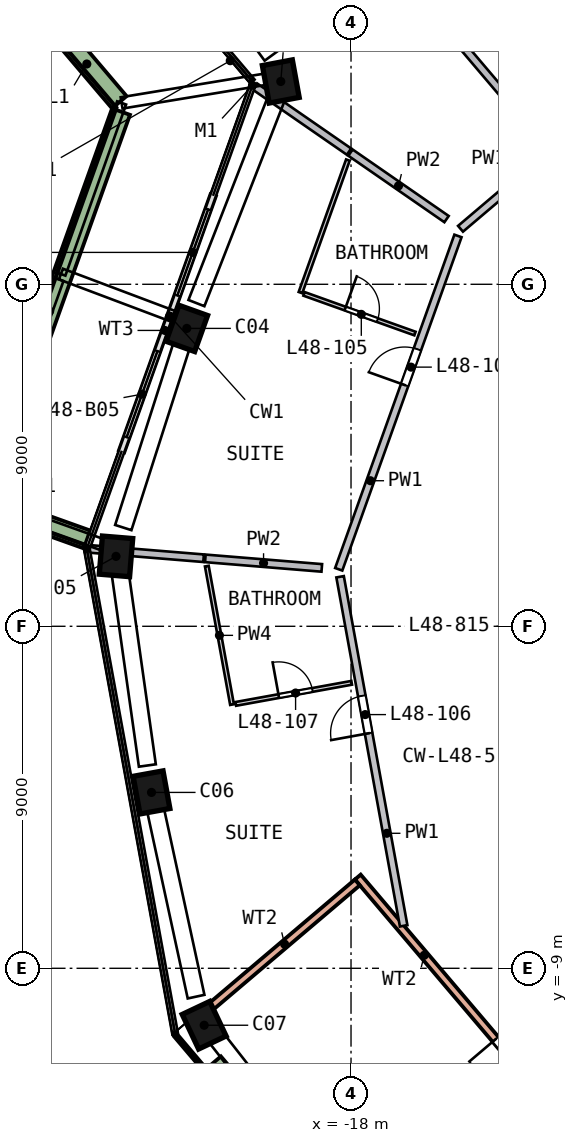
"""IFC4 building model, lengths in metres.
Left out: names, types, materials, properties, quantities, classifications, styles, units other than length and angle.
Written with IfcOpenShell. Run it as: python <this file> out.ifc"""

import sys

from ifc_helpers import new_model, si_unit, direction, frame, frame_2d, origin, origin_2d, place, context, subcontext, project, spatial, rectangle, extrude, element, fill, save


model = new_model("IFC4")
c1 = context("Model", 3, precision=1e-05, world=origin(), true_north=direction((0.0, 1.0)))
c2 = subcontext(c1, "Body", "Model", "MODEL_VIEW")
j1 = project(units=[si_unit("LENGTHUNIT", "METRE"), si_unit("PLANEANGLEUNIT", "RADIAN")], contexts=[c1])
p1 = place(None, origin())
s1 = spatial("IfcSite", under=j1, at=p1, CompositionType="ELEMENT")
p2 = place(p1, origin())
s2 = spatial("IfcBuilding", under=s1, at=p2, CompositionType="ELEMENT")
p3 = place(p2, frame((0.0, 0.0, 197.5)))
s3 = spatial("IfcBuildingStorey", under=s2, at=p3, CompositionType="ELEMENT", Elevation=197.5)
p4 = place(p3, frame((-19.766, 14.451, 0.0), z_axis=(-0.067880715, -0.094561713, 0.993202039), x_axis=(-0.18554858, 0.979327278, 0.080559334)))
e1 = element("IfcColumn", 1, at=p4, inside=s3, PredefinedType="COLUMN", context=c2, shape_type="SweptSolid", body=[
    extrude(rectangle(XDim=1.0, YDim=0.8, at=origin_2d()), origin(), (0.0, 0.0, 1.0), 3.212),
])
p5 = place(p3, frame((-22.276, 7.967, 0.0), z_axis=(-0.037035652, -0.106239847, 0.99365057), x_axis=(-0.33503593, -0.935464206, -0.112506199)))
e2 = element("IfcColumn", 2, at=p5, inside=s3, PredefinedType="COLUMN", context=c2, shape_type="SweptSolid", body=[
    extrude(rectangle(XDim=1.0, YDim=0.8, at=origin_2d()), origin(), (0.0, 0.0, 1.0), 3.21),
])
p6 = place(p3, frame((-24.174, 1.979, 0.0), z_axis=(-0.008514659, -0.115023924, 0.993326229), x_axis=(0.08173816, 0.989957987, 0.115334541)))
e3 = element("IfcColumn", 3, at=p6, inside=s3, PredefinedType="COLUMN", context=c2, shape_type="SweptSolid", body=[
    extrude(rectangle(XDim=1.0, YDim=0.8, at=origin_2d()), origin(), (0.0, 0.0, 1.0), 3.211),
])
p7 = place(p3, frame((-23.276, -4.238, 0.0), z_axis=(0.021065327, -0.110573955, 0.993644631), x_axis=(0.177664557, -0.977632783, -0.112558637)))
e4 = element("IfcColumn", 4, at=p7, inside=s3, PredefinedType="COLUMN", context=c2, shape_type="SweptSolid", body=[
    extrude(rectangle(XDim=1.0, YDim=0.8, at=origin_2d()), origin(), (0.0, 0.0, 1.0), 3.21),
])
p8 = place(p3, frame((-21.925, -10.373, 0.0), z_axis=(0.050251525, -0.103848084, 0.993322888), x_axis=(-0.425063091, 0.897782086, 0.115363312)))
e5 = element("IfcColumn", 5, at=p8, inside=s3, PredefinedType="COLUMN", context=c2, shape_type="SweptSolid", body=[
    extrude(rectangle(XDim=1.0, YDim=0.8, at=origin_2d()), origin(), (0.0, 0.0, 1.0), 3.211),
])
p9 = place(p3, frame((-21.626, 11.345, 0.0), z_axis=(0.0, 0.0, 1.0), x_axis=(-0.336768495, -0.941587479, 0.0)))
e6 = element("IfcWall", 6, at=p9, inside=s3, PredefinedType="SOLIDWALL", context=c2, shape_type="SweptSolid", body=[
    extrude(rectangle(XDim=3.4, YDim=0.15, at=frame_2d((1.7, 0.0))), origin(), (0.0, 0.0, 1.0), 2.475),
])
p10 = place(p9, frame((0.4, 0.0, 0.0)))
e7 = element("IfcOpeningElement", 7, at=p10, cuts=e6, PredefinedType="OPENING", context=c2, shape_type="SweptSolid", body=[
    extrude(rectangle(XDim=2.4, YDim=2.4, at=frame_2d((1.2, 1.2))), frame((0.0, 0.085, 0.0), z_axis=(0.0, -1.0, 0.0), x_axis=(1.0, 0.0, 0.0)), (0.0, 0.0, 1.0), 0.17),
])
p11 = place(p3, frame((-22.771, 8.144, 0.0), z_axis=(0.0, 0.0, 1.0), x_axis=(-0.336755785, -0.941592025, 0.0)))
e8 = element("IfcWall", 8, at=p11, inside=s3, PredefinedType="SOLIDWALL", context=c2, shape_type="SweptSolid", body=[
    extrude(rectangle(XDim=3.761, YDim=0.15, at=frame_2d((1.881, 0.0))), origin(), (0.0, 0.0, 1.0), 2.475),
])
p12 = place(p11, frame((0.961, 0.0, 0.0)))
e9 = element("IfcOpeningElement", 9, at=p12, cuts=e8, PredefinedType="OPENING", context=c2, shape_type="SweptSolid", body=[
    extrude(rectangle(XDim=2.4, YDim=2.4, at=frame_2d((1.2, 1.2))), frame((0.0, 0.085, 0.0), z_axis=(0.0, -1.0, 0.0), x_axis=(1.0, 0.0, 0.0)), (0.0, 0.0, 1.0), 0.17),
])
p13 = place(p3, frame((-25.807, 15.805, 0.0), z_axis=(0.0, 0.0, 1.0), x_axis=(0.647071825, -0.762429048, 0.0)))
e10 = element("IfcWall", 10, at=p13, inside=s3, PredefinedType="SOLIDWALL", context=c2, shape_type="SweptSolid", body=[
    extrude(rectangle(XDim=2.643, YDim=0.5, at=frame_2d((1.322, 0.0))), origin(), (0.0, 0.0, 1.0), 0.7),
])
p14 = place(p3, frame((-24.052, 13.543, 0.0), z_axis=(0.0, 0.0, 1.0), x_axis=(-0.336774581, -0.941585302, 0.0)))
e11 = element("IfcWall", 11, at=p14, inside=s3, PredefinedType="SOLIDWALL", context=c2, shape_type="SweptSolid", body=[
    extrude(rectangle(XDim=11.152, YDim=0.5, at=frame_2d((5.576, 0.0))), origin(), (0.0, 0.0, 1.0), 0.7),
])
p15 = place(p3, frame((-27.489, 3.194, 0.0), z_axis=(0.0, 0.0, 1.0), x_axis=(0.94159448, -0.336748919, 0.0)))
e12 = element("IfcWall", 12, at=p15, inside=s3, PredefinedType="SOLIDWALL", context=c2, shape_type="SweptSolid", body=[
    extrude(rectangle(XDim=2.699, YDim=0.5, at=frame_2d((1.35, 0.0))), origin(), (0.0, 0.0, 1.0), 0.7),
])
p16 = place(p3, frame((-9.41, -16.511, 0.0), z_axis=(0.0, 0.0, 1.0), x_axis=(-0.647046931, 0.762450175, 0.0)))
e13 = element("IfcWall", 13, at=p16, inside=s3, PredefinedType="SOLIDWALL", context=c2, shape_type="SweptSolid", body=[
    extrude(rectangle(XDim=13.0, YDim=0.2, at=frame_2d((6.5, 0.0))), origin(), (0.0, 0.0, 1.0), 3.19),
])
p17 = place(p16, frame((5.6, 0.0, 0.0)))
e14 = element("IfcOpeningElement", 14, at=p17, cuts=e13, PredefinedType="OPENING", context=c2, shape_type="SweptSolid", body=[
    extrude(rectangle(XDim=1.8, YDim=2.4, at=frame_2d((0.9, 1.2))), frame((0.0, 0.11, 0.0), z_axis=(0.0, -1.0, 0.0), x_axis=(1.0, 0.0, 0.0)), (0.0, 0.0, 1.0), 0.22),
])
p18 = place(p3, frame((-21.661, -9.989, 0.0), z_axis=(0.0, 0.0, 1.0), x_axis=(0.762442982, 0.647055406, 0.0)))
e15 = element("IfcWall", 15, at=p18, inside=s3, PredefinedType="SOLIDWALL", context=c2, shape_type="SweptSolid", body=[
    extrude(rectangle(XDim=5.021, YDim=0.2, at=frame_2d((2.51, 0.0))), origin(), (0.0, 0.0, 1.0), 3.19),
])
p19 = place(p3, frame((-22.612, -10.769, 0.0), z_axis=(0.0, 0.0, 1.0), x_axis=(0.647050477, -0.762447166, 0.0)))
e16 = element("IfcWall", 16, at=p19, inside=s3, PredefinedType="SOLIDWALL", context=c2, shape_type="SweptSolid", body=[
    extrude(rectangle(XDim=12.84, YDim=0.1, at=frame_2d((6.42, 0.0))), origin(), (0.0, 0.0, 1.0), 0.7),
])
p20 = place(p3, frame((-21.615, -11.48, 0.0), z_axis=(0.0, 0.0, 1.0), x_axis=(0.64706844, -0.762431921, 0.0)))
e17 = element("IfcWall", 17, at=p20, inside=s3, PredefinedType="SOLIDWALL", context=c2, shape_type="SweptSolid", body=[
    extrude(rectangle(XDim=4.633, YDim=0.5, at=frame_2d((2.316, 0.0))), origin(), (0.0, 0.0, 1.0), 0.7),
])
p21 = place(p3, frame((-16.615, -7.882, 0.0), z_axis=(0.0, 0.0, 1.0), x_axis=(-0.179145456, 0.983822599, 0.0)))
e18 = element("IfcWall", 18, at=p21, inside=s3, PredefinedType="SOLIDWALL", context=c2, shape_type="SweptSolid", body=[
    extrude(rectangle(XDim=9.337, YDim=0.2, at=frame_2d((4.668, 0.0))), origin(), (0.0, 0.0, 1.0), 3.19),
])
p22 = place(p21, frame((5.15, 0.0, 0.0)))
e19 = element("IfcOpeningElement", 19, at=p22, cuts=e18, PredefinedType="OPENING", context=c2, shape_type="SweptSolid", body=[
    extrude(rectangle(XDim=1.0, YDim=2.1, at=frame_2d((0.5, 1.05))), frame((0.0, 0.11, 0.0), z_axis=(0.0, -1.0, 0.0), x_axis=(1.0, 0.0, 0.0)), (0.0, 0.0, 1.0), 0.22),
])
p23 = place(p3, frame((-18.323, 1.5, 0.0), z_axis=(0.0, 0.0, 1.0), x_axis=(0.336758012, 0.941591228, 0.0)))
e20 = element("IfcWall", 20, at=p23, inside=s3, PredefinedType="SOLIDWALL", context=c2, shape_type="SweptSolid", body=[
    extrude(rectangle(XDim=9.317, YDim=0.2, at=frame_2d((4.658, 0.0))), origin(), (0.0, 0.0, 1.0), 3.19),
])
p24 = place(p23, frame((5.15, 0.0, 0.0)))
e21 = element("IfcOpeningElement", 21, at=p24, cuts=e20, PredefinedType="OPENING", context=c2, shape_type="SweptSolid", body=[
    extrude(rectangle(XDim=1.0, YDim=2.1, at=frame_2d((0.5, 1.05))), frame((0.0, 0.11, 0.0), z_axis=(0.0, -1.0, 0.0), x_axis=(1.0, 0.0, 0.0)), (0.0, 0.0, 1.0), 0.22),
])
p25 = place(p3, frame((-15.119, 10.461, 0.0), z_axis=(0.0, 0.0, 1.0), x_axis=(0.762438227, 0.64706101, 0.0)))
e22 = element("IfcWall", 22, at=p25, inside=s3, PredefinedType="SOLIDWALL", context=c2, shape_type="SweptSolid", body=[
    extrude(rectangle(XDim=9.317, YDim=0.2, at=frame_2d((4.658, 0.0))), origin(), (0.0, 0.0, 1.0), 3.19),
])
p26 = place(p25, frame((3.853, 0.0, 0.0)))
e23 = element("IfcOpeningElement", 23, at=p26, cuts=e22, PredefinedType="OPENING", context=c2, shape_type="SweptSolid", body=[
    extrude(rectangle(XDim=1.8, YDim=2.1, at=frame_2d((0.9, 1.05))), frame((0.0, 0.11, 0.0), z_axis=(0.0, -1.0, 0.0), x_axis=(1.0, 0.0, 0.0)), (0.0, 0.0, 1.0), 0.22),
])
p27 = place(p3, frame((-21.879, 1.791, 0.0), z_axis=(0.0, 0.0, 1.0), x_axis=(-0.996662173, 0.081636474, 0.0)))
e24 = element("IfcWall", 24, at=p27, inside=s3, PredefinedType="SOLIDWALL", context=c2, shape_type="SweptSolid", body=[
    extrude(rectangle(XDim=3.011, YDim=0.2, at=frame_2d((1.506, 0.0))), origin(), (0.0, 0.0, 1.0), 3.19),
])
p28 = place(p3, frame((-18.769, 1.537, 0.0), z_axis=(0.0, 0.0, 1.0), x_axis=(-0.996669487, 0.081547129, 0.0)))
e25 = element("IfcWall", 25, at=p28, inside=s3, PredefinedType="SOLIDWALL", context=c2, shape_type="SweptSolid", body=[
    extrude(rectangle(XDim=3.075, YDim=0.2, at=frame_2d((1.537, 0.0))), origin(), (0.0, 0.0, 1.0), 3.19),
])
p29 = place(p3, frame((-18.052, 12.491, 0.0), z_axis=(0.0, 0.0, 1.0), x_axis=(-0.822373098, 0.568948581, 0.0)))
e26 = element("IfcWall", 26, at=p29, inside=s3, PredefinedType="SOLIDWALL", context=c2, shape_type="SweptSolid", body=[
    extrude(rectangle(XDim=3.011, YDim=0.2, at=frame_2d((1.506, 0.0))), origin(), (0.0, 0.0, 1.0), 3.19),
])
p30 = place(p3, frame((-12.844, 12.654, 0.0), z_axis=(0.0, 0.0, 1.0), x_axis=(-0.647054482, 0.762443767, 0.0)))
e27 = element("IfcWall", 27, at=p30, inside=s3, PredefinedType="SOLIDWALL", context=c2, shape_type="SweptSolid", body=[
    extrude(rectangle(XDim=14.741, YDim=0.2, at=frame_2d((7.37, 0.0))), origin(), (0.0, 0.0, 1.0), 3.19),
])
p31 = place(p30, frame((4.6, 0.0, 0.0)))
e28 = element("IfcOpeningElement", 28, at=p31, cuts=e27, PredefinedType="OPENING", context=c2, shape_type="SweptSolid", body=[
    extrude(rectangle(XDim=1.0, YDim=2.1, at=frame_2d((0.5, 1.05))), frame((0.0, 0.11, 0.0), z_axis=(0.0, -1.0, 0.0), x_axis=(1.0, 0.0, 0.0)), (0.0, 0.0, 1.0), 0.22),
])
p32 = place(p3, frame((-15.486, 10.715, 0.0), z_axis=(0.0, 0.0, 1.0), x_axis=(-0.822349373, 0.568982872, 0.0)))
e29 = element("IfcWall", 29, at=p32, inside=s3, PredefinedType="SOLIDWALL", context=c2, shape_type="SweptSolid", body=[
    extrude(rectangle(XDim=3.075, YDim=0.2, at=frame_2d((1.537, 0.0))), origin(), (0.0, 0.0, 1.0), 3.19),
])
p33 = place(p3, frame((-19.856, 26.037, 0.0), z_axis=(0.0, 0.0, 1.0), x_axis=(0.64706411, -0.762435596, 0.0)))
e30 = element("IfcWall", 30, at=p33, inside=s3, PredefinedType="SOLIDWALL", context=c2, shape_type="SweptSolid", body=[
    extrude(rectangle(XDim=14.741, YDim=0.2, at=frame_2d((7.371, 0.0))), origin(), (0.0, 0.0, 1.0), 3.19),
])
p34 = place(p33, frame((4.65, 0.0, 0.0)))
e31 = element("IfcOpeningElement", 31, at=p34, cuts=e30, PredefinedType="OPENING", context=c2, shape_type="SweptSolid", body=[
    extrude(rectangle(XDim=1.0, YDim=2.1, at=frame_2d((0.5, 1.05))), frame((0.0, 0.11, 0.0), z_axis=(0.0, -1.0, 0.0), x_axis=(1.0, 0.0, 0.0)), (0.0, 0.0, 1.0), 0.22),
])
p35 = place(p3, frame((-21.131, -2.061, 0.0), z_axis=(0.0, 0.0, 1.0), x_axis=(-0.179152249, 0.983821362, 0.0)))
e32 = element("IfcWall", 32, at=p35, inside=s3, PredefinedType="PARTITIONING", context=c2, shape_type="SweptSolid", body=[
    extrude(rectangle(XDim=3.704, YDim=0.1, at=frame_2d((1.852, 0.0))), origin(), (0.0, 0.0, 1.0), 3.19),
])
p36 = place(p3, frame((-21.033, -2.042, 0.0), z_axis=(0.0, 0.0, 1.0), x_axis=(0.983832085, 0.179093353, 0.0)))
e33 = element("IfcWall", 33, at=p36, inside=s3, PredefinedType="PARTITIONING", context=c2, shape_type="SweptSolid", body=[
    extrude(rectangle(XDim=3.1, YDim=0.1, at=frame_2d((1.55, 0.0))), origin(), (0.0, 0.0, 1.0), 3.19),
])
p37 = place(p36, frame((1.15, 0.0, 0.0)))
e34 = element("IfcOpeningElement", 34, at=p37, cuts=e33, PredefinedType="OPENING", context=c2, shape_type="SweptSolid", body=[
    extrude(rectangle(XDim=0.9, YDim=2.1, at=frame_2d((0.45, 1.05))), frame((0.0, 0.06, 0.0), z_axis=(0.0, -1.0, 0.0), x_axis=(1.0, 0.0, 0.0)), (0.0, 0.0, 1.0), 0.12),
])
p38 = place(p3, frame((-19.33, 8.781, 0.0), z_axis=(0.0, 0.0, 1.0), x_axis=(0.336737198, 0.941598672, 0.0)))
e35 = element("IfcWall", 35, at=p38, inside=s3, PredefinedType="PARTITIONING", context=c2, shape_type="SweptSolid", body=[
    extrude(rectangle(XDim=3.704, YDim=0.1, at=frame_2d((1.852, 0.0))), origin(), (0.0, 0.0, 1.0), 3.19),
])
p39 = place(p3, frame((-19.236, 8.747, 0.0), z_axis=(0.0, 0.0, 1.0), x_axis=(0.941592149, -0.336755439, 0.0)))
e36 = element("IfcWall", 36, at=p39, inside=s3, PredefinedType="PARTITIONING", context=c2, shape_type="SweptSolid", body=[
    extrude(rectangle(XDim=3.1, YDim=0.1, at=frame_2d((1.55, 0.0))), origin(), (0.0, 0.0, 1.0), 3.19),
])
p40 = place(p39, frame((1.15, 0.0, 0.0)))
e37 = element("IfcOpeningElement", 37, at=p40, cuts=e36, PredefinedType="OPENING", context=c2, shape_type="SweptSolid", body=[
    extrude(rectangle(XDim=0.9, YDim=2.1, at=frame_2d((0.45, 1.05))), frame((0.0, 0.06, 0.0), z_axis=(0.0, -1.0, 0.0), x_axis=(1.0, 0.0, 0.0)), (0.0, 0.0, 1.0), 0.12),
])
p41 = place(p10, origin())
e38 = element("IfcDoor", 38, at=p41, inside=s3, OperationType="SLIDING_TO_RIGHT", PredefinedType="DOOR", context=c2, shape_type="SweptSolid", body=[
    extrude(rectangle(XDim=2.4, YDim=2.4, at=frame_2d((1.2, 1.2))), frame((0.0, 0.025, 0.0), z_axis=(0.0, -1.0, 0.0), x_axis=(1.0, 0.0, 0.0)), (0.0, 0.0, 1.0), 0.05),
])
fill(e7, e38)
p42 = place(p12, origin())
e39 = element("IfcDoor", 39, at=p42, inside=s3, OperationType="SLIDING_TO_LEFT", PredefinedType="DOOR", context=c2, shape_type="SweptSolid", body=[
    extrude(rectangle(XDim=2.4, YDim=2.4, at=frame_2d((1.2, 1.2))), frame((0.0, 0.025, 0.0), z_axis=(0.0, -1.0, 0.0), x_axis=(1.0, 0.0, 0.0)), (0.0, 0.0, 1.0), 0.05),
])
fill(e9, e39)
p43 = place(p17, origin())
e40 = element("IfcDoor", 40, at=p43, inside=s3, OperationType="DOUBLE_DOOR_SINGLE_SWING", PredefinedType="DOOR", context=c2, shape_type="SweptSolid", body=[
    extrude(rectangle(XDim=1.8, YDim=2.4, at=frame_2d((0.9, 1.2))), frame((0.0, 0.025, 0.0), z_axis=(0.0, -1.0, 0.0), x_axis=(1.0, 0.0, 0.0)), (0.0, 0.0, 1.0), 0.05),
])
fill(e14, e40)
p44 = place(p24, origin())
e41 = element("IfcDoor", 41, at=p44, inside=s3, OperationType="SINGLE_SWING_LEFT", PredefinedType="DOOR", context=c2, shape_type="SweptSolid", body=[
    extrude(rectangle(XDim=1.0, YDim=2.1, at=frame_2d((0.5, 1.05))), frame((0.0, 0.025, 0.0), z_axis=(0.0, -1.0, 0.0), x_axis=(1.0, 0.0, 0.0)), (0.0, 0.0, 1.0), 0.05),
])
fill(e21, e41)
p45 = place(p40, origin())
e42 = element("IfcDoor", 42, at=p45, inside=s3, OperationType="SINGLE_SWING_LEFT", PredefinedType="DOOR", context=c2, shape_type="SweptSolid", body=[
    extrude(rectangle(XDim=0.9, YDim=2.1, at=frame_2d((0.45, 1.05))), frame((0.0, 0.025, 0.0), z_axis=(0.0, -1.0, 0.0), x_axis=(1.0, 0.0, 0.0)), (0.0, 0.0, 1.0), 0.05),
])
fill(e37, e42)
p46 = place(p22, origin())
e43 = element("IfcDoor", 43, at=p46, inside=s3, OperationType="SINGLE_SWING_LEFT", PredefinedType="DOOR", context=c2, shape_type="SweptSolid", body=[
    extrude(rectangle(XDim=1.0, YDim=2.1, at=frame_2d((0.5, 1.05))), frame((0.0, 0.025, 0.0), z_axis=(0.0, -1.0, 0.0), x_axis=(1.0, 0.0, 0.0)), (0.0, 0.0, 1.0), 0.05),
])
fill(e19, e43)
p47 = place(p37, origin())
e44 = element("IfcDoor", 44, at=p47, inside=s3, OperationType="SINGLE_SWING_LEFT", PredefinedType="DOOR", context=c2, shape_type="SweptSolid", body=[
    extrude(rectangle(XDim=0.9, YDim=2.1, at=frame_2d((0.45, 1.05))), frame((0.0, 0.025, 0.0), z_axis=(0.0, -1.0, 0.0), x_axis=(1.0, 0.0, 0.0)), (0.0, 0.0, 1.0), 0.05),
])
fill(e34, e44)
save(model, sys.argv[1])
